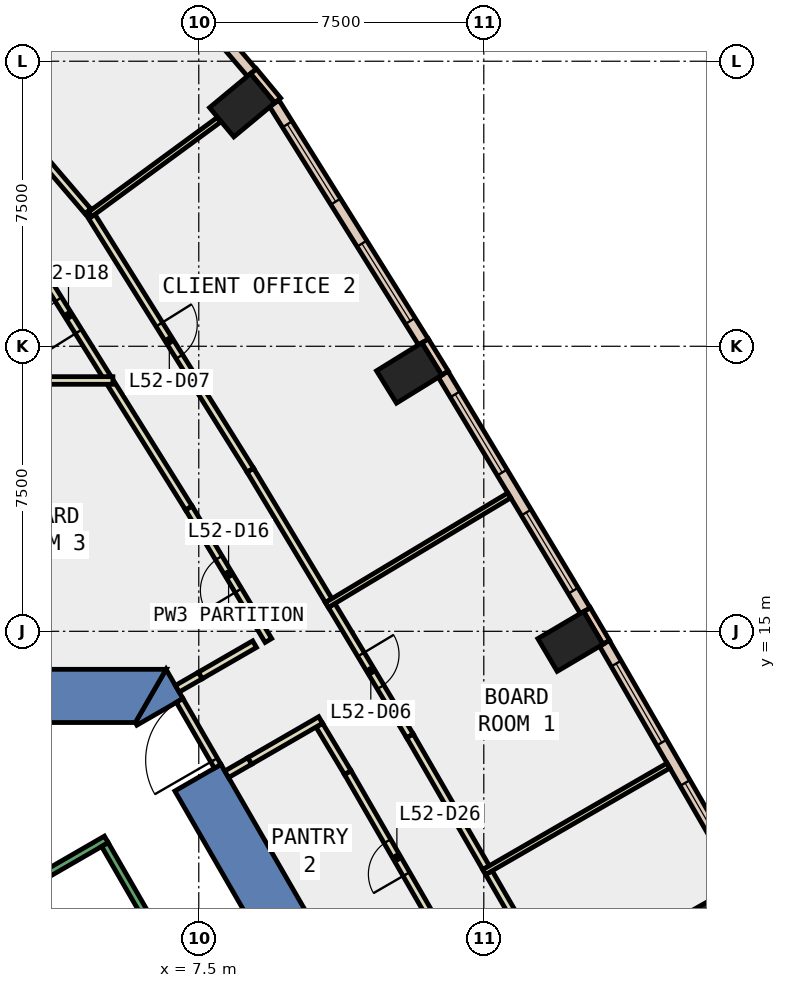
"""IFC4 building model, lengths in metres.
Left out: names, types, materials, properties, quantities, classifications, styles, units other than length and angle.
Written with IfcOpenShell. Run it as: python <this file> out.ifc"""

import sys

from ifc_helpers import new_model, si_unit, direction, frame, frame_2d, origin, origin_2d, place, context, subcontext, project, spatial, polyline, rectangle, outline, extrude, element, fill, save


model = new_model("IFC4")
c1 = context("Model", 3, precision=1e-05, world=origin(), true_north=direction((0.0, 1.0)))
c2 = subcontext(c1, "Body", "Model", "MODEL_VIEW")
j1 = project(units=[si_unit("LENGTHUNIT", "METRE"), si_unit("PLANEANGLEUNIT", "RADIAN")], contexts=[c1])
p1 = place(None, origin())
s1 = spatial("IfcSite", under=j1, at=p1, CompositionType="ELEMENT")
p2 = place(p1, origin())
s2 = spatial("IfcBuilding", under=s1, at=p2, CompositionType="ELEMENT")
p3 = place(p2, frame((0.0, 0.0, 231.8)))
s3 = spatial("IfcBuildingStorey", under=s2, at=p3, CompositionType="ELEMENT", Elevation=231.8)
for number, where, z_axis, x_axis in (
    (1, (21.4, 7.599, -0.4), (0.0, 0.0, 1.0), (-0.491, 0.871, 0.0)),
    (2, (17.28, 14.733, -0.4), (0.0, 0.0, 1.0), (-0.509, 0.861, 0.0)),
    (3, (13.036, 21.797, -0.4), (0.0, 0.0, 1.0), (-0.525, 0.851, 0.0)),
    (4, (8.642, 28.842, -0.4), (0.0, 0.0, 1.0), (-0.639, 0.769, 0.0)),
):
    element("IfcColumn", number, at=place(p3, frame(where, z_axis=z_axis, x_axis=x_axis)), inside=s3, PredefinedType="COLUMN", context=c2, shape_type="SweptSolid", body=[
        extrude(rectangle(XDim=1.0, YDim=1.4, at=origin_2d()), origin(), (0.0, 0.0, 1.0), 4.0),
    ])
p4 = place(p3, frame((0.0, 0.0, -0.4)))
e5 = element("IfcWall", 5, at=p4, inside=s3, PredefinedType="SHEAR", context=c2, shape_type="SweptSolid", body=[
    extrude(outline(polyline([(8.084, 11.498), (6.871, 10.798), (11.662, 2.5), (13.279, 2.5), (8.084, 11.498)])), origin(), (0.0, 0.0, 1.0), 4.0),
])
p5 = place(p3, frame((0.0, 0.0, -0.4)))
e6 = element("IfcWall", 6, at=p5, inside=s3, PredefinedType="SHEAR", context=c2, shape_type="SweptSolid", body=[
    extrude(outline(polyline([(5.871, 12.53), (7.084, 13.23), (6.64, 14.0), (5.831, 12.6), (5.871, 12.53)])), origin(), (0.0, 0.0, 1.0), 4.0),
])
p6 = place(p3, frame((0.0, 0.0, -0.4)))
e7 = element("IfcWall", 7, at=p6, inside=s3, PredefinedType="SHEAR", context=c2, shape_type="SweptSolid", body=[
    extrude(outline(polyline([(6.64, 14.0), (-6.64, 14.0), (-5.831, 12.6), (5.831, 12.6), (6.64, 14.0)])), origin(), (0.0, 0.0, 1.0), 4.0),
])
p7 = place(p3, frame((18.223, 14.71, 0.0), z_axis=(0.0, 0.0, 1.0), x_axis=(-0.507980373775, 0.861368643416, 0.0)))
e8 = element("IfcWall", 8, at=p7, inside=s3, PredefinedType="STANDARD", context=c2, shape_type="SweptSolid", body=[
    extrude(rectangle(XDim=1.0, YDim=0.2, at=frame_2d((0.5, 0.0))), origin(), (0.0, 0.0, 1.0), 3.6),
])
p8 = place(p3, frame((13.98, 21.792, 0.0), z_axis=(0.0, 0.0, 1.0), x_axis=(-0.525648735675, 0.850701714282, 0.0)))
e9 = element("IfcWall", 9, at=p8, inside=s3, PredefinedType="STANDARD", context=c2, shape_type="SweptSolid", body=[
    extrude(rectangle(XDim=1.0, YDim=0.2, at=frame_2d((0.5, 0.0))), origin(), (0.0, 0.0, 1.0), 3.6),
])
p9 = place(p3, frame((9.577, 28.968, 0.0), z_axis=(0.0, 0.0, 1.0), x_axis=(-0.637972365578, 0.770059257953, 0.0)))
e10 = element("IfcWall", 10, at=p9, inside=s3, PredefinedType="STANDARD", context=c2, shape_type="SweptSolid", body=[
    extrude(rectangle(XDim=1.0, YDim=0.2, at=frame_2d((0.5, 0.0))), origin(), (0.0, 0.0, 1.0), 3.6),
])
p10 = place(p3, frame((21.804, 8.399, 0.0), z_axis=(0.0, 0.0, 1.0), x_axis=(-0.500075798504, 0.865981637075, 0.0)))
e11 = element("IfcWall", 11, at=p10, inside=s3, PredefinedType="STANDARD", context=c2, shape_type="SweptSolid", body=[
    extrude(rectangle(XDim=7.257, YDim=0.3, at=frame_2d((3.628, 0.0))), origin(), (0.0, 0.0, 1.0), 3.6),
])
p11 = place(p10, frame((0.614, 0.0, 0.9)))
e12 = element("IfcOpeningElement", 12, at=p11, cuts=e11, PredefinedType="OPENING", context=c2, shape_type="SweptSolid", body=[
    extrude(rectangle(XDim=2.4, YDim=2.6, at=frame_2d((1.2, 1.3))), frame((0.0, 0.16, 0.0), z_axis=(0.0, -1.0, 0.0), x_axis=(1.0, 0.0, 0.0)), (0.0, 0.0, 1.0), 0.32),
])
p12 = place(p10, frame((4.242, 0.0, 0.9)))
e13 = element("IfcOpeningElement", 13, at=p12, cuts=e11, PredefinedType="OPENING", context=c2, shape_type="SweptSolid", body=[
    extrude(rectangle(XDim=2.4, YDim=2.6, at=frame_2d((1.2, 1.3))), frame((0.0, 0.16, 0.0), z_axis=(0.0, -1.0, 0.0), x_axis=(1.0, 0.0, 0.0)), (0.0, 0.0, 1.0), 0.32),
])
p13 = place(p3, frame((17.669, 15.542, 0.0), z_axis=(0.0, 0.0, 1.0), x_axis=(-0.515049705348, 0.857160312323, 0.0)))
e14 = element("IfcWall", 14, at=p13, inside=s3, PredefinedType="STANDARD", context=c2, shape_type="SweptSolid", body=[
    extrude(rectangle(XDim=7.258, YDim=0.3, at=frame_2d((3.629, 0.0))), origin(), (0.0, 0.0, 1.0), 3.6),
])
p14 = place(p13, frame((0.614, 0.0, 0.9)))
e15 = element("IfcOpeningElement", 15, at=p14, cuts=e14, PredefinedType="OPENING", context=c2, shape_type="SweptSolid", body=[
    extrude(rectangle(XDim=2.4, YDim=2.6, at=frame_2d((1.2, 1.3))), frame((0.0, 0.16, 0.0), z_axis=(0.0, -1.0, 0.0), x_axis=(1.0, 0.0, 0.0)), (0.0, 0.0, 1.0), 0.32),
])
p15 = place(p13, frame((4.243, 0.0, 0.9)))
e16 = element("IfcOpeningElement", 16, at=p15, cuts=e14, PredefinedType="OPENING", context=c2, shape_type="SweptSolid", body=[
    extrude(rectangle(XDim=2.4, YDim=2.6, at=frame_2d((1.2, 1.3))), frame((0.0, 0.16, 0.0), z_axis=(0.0, -1.0, 0.0), x_axis=(1.0, 0.0, 0.0)), (0.0, 0.0, 1.0), 0.32),
])
p16 = place(p3, frame((13.41, 22.614, 0.0), z_axis=(0.0, 0.0, 1.0), x_axis=(-0.530037467052, 0.847974223383, 0.0)))
e17 = element("IfcWall", 17, at=p16, inside=s3, PredefinedType="STANDARD", context=c2, shape_type="SweptSolid", body=[
    extrude(rectangle(XDim=7.405, YDim=0.3, at=frame_2d((3.702, 0.0))), origin(), (0.0, 0.0, 1.0), 3.6),
])
p17 = place(p16, frame((0.651, 0.0, 0.9)))
e18 = element("IfcOpeningElement", 18, at=p17, cuts=e17, PredefinedType="OPENING", context=c2, shape_type="SweptSolid", body=[
    extrude(rectangle(XDim=2.4, YDim=2.6, at=frame_2d((1.2, 1.3))), frame((0.0, 0.16, 0.0), z_axis=(0.0, -1.0, 0.0), x_axis=(1.0, 0.0, 0.0)), (0.0, 0.0, 1.0), 0.32),
])
p18 = place(p16, frame((4.354, 0.0, 0.9)))
e19 = element("IfcOpeningElement", 19, at=p18, cuts=e17, PredefinedType="OPENING", context=c2, shape_type="SweptSolid", body=[
    extrude(rectangle(XDim=2.4, YDim=2.6, at=frame_2d((1.2, 1.3))), frame((0.0, 0.16, 0.0), z_axis=(0.0, -1.0, 0.0), x_axis=(1.0, 0.0, 0.0)), (0.0, 0.0, 1.0), 0.32),
])
p19 = place(p3, frame((8.895, 29.7, 0.0), z_axis=(0.0, 0.0, 1.0), x_axis=(-0.649967502437, 0.75996200285, 0.0)))
e20 = element("IfcWall", 20, at=p19, inside=s3, PredefinedType="STANDARD", context=c2, shape_type="SweptSolid", body=[
    extrude(rectangle(XDim=4.492, YDim=0.3, at=frame_2d((2.246, 0.0))), origin(), (0.0, 0.0, 1.0), 3.6),
])
p20 = place(p19, frame((1.546, 0.0, 0.9)))
e21 = element("IfcOpeningElement", 21, at=p20, cuts=e20, PredefinedType="OPENING", context=c2, shape_type="SweptSolid", body=[
    extrude(rectangle(XDim=1.4, YDim=2.6, at=frame_2d((0.7, 1.3))), frame((0.0, 0.16, 0.0), z_axis=(0.0, -1.0, 0.0), x_axis=(1.0, 0.0, 0.0)), (0.0, 0.0, 1.0), 0.32),
])
p21 = place(p3, frame((14.006, 6.804, 0.0), z_axis=(0.0, 0.0, 1.0), x_axis=(-0.500032993936, 0.866006353889, 0.0)))
e22 = element("IfcWall", 22, at=p21, inside=s3, PredefinedType="PARTITIONING", context=c2, shape_type="SweptSolid", body=[
    extrude(rectangle(XDim=5.172, YDim=0.2, at=frame_2d((2.586, 0.0))), origin(), (0.0, 0.0, 1.0), 3.6),
])
p22 = place(p21, frame((2.086, 0.0, 0.0)))
e23 = element("IfcOpeningElement", 23, at=p22, cuts=e22, PredefinedType="OPENING", context=c2, shape_type="SweptSolid", body=[
    extrude(rectangle(XDim=1.0, YDim=2.1, at=frame_2d((0.5, 1.05))), frame((0.0, 0.11, 0.0), z_axis=(0.0, -1.0, 0.0), x_axis=(1.0, 0.0, 0.0)), (0.0, 0.0, 1.0), 0.22),
])
p23 = place(p3, frame((11.42, 11.283, 0.0), z_axis=(0.0, 0.0, 1.0), x_axis=(-0.514890585899, 0.857255903772, 0.0)))
e24 = element("IfcWall", 24, at=p23, inside=s3, PredefinedType="PARTITIONING", context=c2, shape_type="SweptSolid", body=[
    extrude(rectangle(XDim=1.455, YDim=0.2, at=frame_2d((0.728, 0.0))), origin(), (0.0, 0.0, 1.0), 3.6),
])
p24 = place(p3, frame((10.706, 12.666, 0.0), z_axis=(0.0, 0.0, 1.0), x_axis=(-0.865862892194, -0.50028137275, 0.0)))
e25 = element("IfcWall", 25, at=p24, inside=s3, PredefinedType="PARTITIONING", context=c2, shape_type="SweptSolid", body=[
    extrude(rectangle(XDim=2.155, YDim=0.2, at=frame_2d((1.078, 0.0))), origin(), (0.0, 0.0, 1.0), 3.6),
])
p25 = place(p3, frame((6.935, 13.488, 0.0), z_axis=(0.0, 0.0, 1.0), x_axis=(0.866022890907, 0.500004352405, 0.0)))
e26 = element("IfcWall", 26, at=p25, inside=s3, PredefinedType="PARTITIONING", context=c2, shape_type="SweptSolid", body=[
    extrude(rectangle(XDim=0.7, YDim=0.2, at=frame_2d((0.35, 0.0))), origin(), (0.0, 0.0, 1.0), 2.4),
])
p26 = place(p3, frame((9.332, 14.759, 0.0), z_axis=(0.0, 0.0, 1.0), x_axis=(-0.514989912292, 0.857196237881, 0.0)))
e27 = element("IfcWall", 27, at=p26, inside=s3, PredefinedType="PARTITIONING", context=c2, shape_type="SweptSolid", body=[
    extrude(rectangle(XDim=4.068, YDim=0.2, at=frame_2d((2.034, 0.0))), origin(), (0.0, 0.0, 1.0), 3.6),
])
p27 = place(p26, frame((1.534, 0.0, 0.0)))
e28 = element("IfcOpeningElement", 28, at=p27, cuts=e27, PredefinedType="OPENING", context=c2, shape_type="SweptSolid", body=[
    extrude(rectangle(XDim=1.0, YDim=2.1, at=frame_2d((0.5, 1.05))), frame((0.0, 0.11, 0.0), z_axis=(0.0, -1.0, 0.0), x_axis=(1.0, 0.0, 0.0)), (0.0, 0.0, 1.0), 0.22),
])
p28 = place(p3, frame((7.237, 18.246, 0.0), z_axis=(0.0, 0.0, 1.0), x_axis=(-0.530175390862, 0.847887996686, 0.0)))
e29 = element("IfcWall", 29, at=p28, inside=s3, PredefinedType="PARTITIONING", context=c2, shape_type="SweptSolid", body=[
    extrude(rectangle(XDim=3.855, YDim=0.2, at=frame_2d((1.928, 0.0))), origin(), (0.0, 0.0, 1.0), 3.6),
])
p29 = place(p3, frame((5.087, 21.685, 0.0), z_axis=(0.0, 0.0, 1.0), x_axis=(-0.529998940003, 0.847998304005, 0.0)))
e30 = element("IfcWall", 30, at=p29, inside=s3, PredefinedType="PARTITIONING", context=c2, shape_type="SweptSolid", body=[
    extrude(rectangle(XDim=3.83, YDim=0.2, at=frame_2d((1.915, 0.0))), origin(), (0.0, 0.0, 1.0), 3.6),
])
p30 = place(p29, frame((1.416, 0.0, 0.0)))
e31 = element("IfcOpeningElement", 31, at=p30, cuts=e30, PredefinedType="OPENING", context=c2, shape_type="SweptSolid", body=[
    extrude(rectangle(XDim=1.0, YDim=2.1, at=frame_2d((0.5, 1.05))), frame((0.0, 0.11, 0.0), z_axis=(0.0, -1.0, 0.0), x_axis=(1.0, 0.0, 0.0)), (0.0, 0.0, 1.0), 0.22),
])
p31 = place(p3, frame((15.135, 8.65, 0.0), z_axis=(0.0, 0.0, 1.0), x_axis=(0.500102734445, -0.865966081899, 0.0)))
e32 = element("IfcWall", 32, at=p31, inside=s3, PredefinedType="PARTITIONING", context=c2, shape_type="SweptSolid", body=[
    extrude(rectangle(XDim=4.001, YDim=0.2, at=frame_2d((2.0, 0.0))), origin(), (0.0, 0.0, 1.0), 3.6),
])
p32 = place(p3, frame((10.996, 15.679, 0.0), z_axis=(0.0, 0.0, 1.0), x_axis=(0.514800663461, -0.857309907152, 0.0)))
e33 = element("IfcWall", 33, at=p32, inside=s3, PredefinedType="PARTITIONING", context=c2, shape_type="SweptSolid", body=[
    extrude(rectangle(XDim=4.003, YDim=0.2, at=frame_2d((2.001, 0.0))), origin(), (0.0, 0.0, 1.0), 3.6),
])
p33 = place(p32, frame((1.502, 0.0, 0.0)))
e34 = element("IfcOpeningElement", 34, at=p33, cuts=e33, PredefinedType="OPENING", context=c2, shape_type="SweptSolid", body=[
    extrude(rectangle(XDim=1.0, YDim=2.1, at=frame_2d((0.5, 1.05))), frame((0.0, 0.11, 0.0), z_axis=(0.0, -1.0, 0.0), x_axis=(1.0, 0.0, 0.0)), (0.0, 0.0, 1.0), 0.22),
])
p34 = place(p3, frame((13.057, 12.247, 0.0), z_axis=(0.0, 0.0, 1.0), x_axis=(0.500093699572, -0.865971299552, 0.0)))
e35 = element("IfcWall", 35, at=p34, inside=s3, PredefinedType="PARTITIONING", context=c2, shape_type="SweptSolid", body=[
    extrude(rectangle(XDim=4.004, YDim=0.2, at=frame_2d((2.002, 0.0))), origin(), (0.0, 0.0, 1.0), 3.6),
])
p35 = place(p3, frame((4.593, 26.061, 0.0), z_axis=(0.0, 0.0, 1.0), x_axis=(0.530012579093, -0.847989779421, 0.0)))
e36 = element("IfcWall", 36, at=p35, inside=s3, PredefinedType="PARTITIONING", context=c2, shape_type="SweptSolid", body=[
    extrude(rectangle(XDim=8.045, YDim=0.2, at=frame_2d((4.022, 0.0))), origin(), (0.0, 0.0, 1.0), 3.6),
])
p36 = place(p35, frame((3.522, 0.0, 0.0)))
e37 = element("IfcOpeningElement", 37, at=p36, cuts=e36, PredefinedType="OPENING", context=c2, shape_type="SweptSolid", body=[
    extrude(rectangle(XDim=1.0, YDim=2.1, at=frame_2d((0.5, 1.05))), frame((0.0, 0.11, 0.0), z_axis=(0.0, -1.0, 0.0), x_axis=(1.0, 0.0, 0.0)), (0.0, 0.0, 1.0), 0.22),
])
p37 = place(p3, frame((8.857, 19.239, 0.0), z_axis=(0.0, 0.0, 1.0), x_axis=(0.514953174362, -0.857218308376, 0.0)))
e38 = element("IfcWall", 38, at=p37, inside=s3, PredefinedType="PARTITIONING", context=c2, shape_type="SweptSolid", body=[
    extrude(rectangle(XDim=4.002, YDim=0.2, at=frame_2d((2.001, 0.0))), origin(), (0.0, 0.0, 1.0), 3.6),
])
p38 = place(p3, frame((2.316, 28.7, 0.0), z_axis=(0.0, 0.0, 1.0), x_axis=(0.650040973726, -0.759899159413, 0.0)))
e39 = element("IfcWall", 39, at=p38, inside=s3, PredefinedType="PARTITIONING", context=c2, shape_type="SweptSolid", body=[
    extrude(rectangle(XDim=3.485, YDim=0.2, at=frame_2d((1.742, 0.0))), origin(), (0.0, 0.0, 1.0), 3.6),
])
p39 = place(p3, frame((0.4, 21.6, 0.0), z_axis=(0.0, 0.0, 1.0), x_axis=(1.0, 0.0, 0.0)))
e40 = element("IfcWall", 40, at=p39, inside=s3, PredefinedType="PARTITIONING", context=c2, shape_type="SweptSolid", body=[
    extrude(rectangle(XDim=4.84, YDim=0.2, at=frame_2d((2.42, 0.0))), origin(), (0.0, 0.0, 1.0), 3.6),
])
p40 = place(p3, frame((15.01, 8.665, 0.0), z_axis=(0.0, 0.0, 1.0), x_axis=(0.865961984968, 0.500109828528, 0.0)))
e41 = element("IfcWall", 41, at=p40, inside=s3, PredefinedType="PARTITIONING", context=c2, shape_type="SweptSolid", body=[
    extrude(rectangle(XDim=5.601, YDim=0.15, at=frame_2d((2.8, 0.0))), origin(), (0.0, 0.0, 1.0), 3.6),
])
p41 = place(p3, frame((10.871, 15.692, 0.0), z_axis=(0.0, 0.0, 1.0), x_axis=(0.857165756431, 0.515040645001, 0.0)))
e42 = element("IfcWall", 42, at=p41, inside=s3, PredefinedType="PARTITIONING", context=c2, shape_type="SweptSolid", body=[
    extrude(rectangle(XDim=5.6, YDim=0.15, at=frame_2d((2.8, 0.0))), origin(), (0.0, 0.0, 1.0), 3.6),
])
p42 = place(p3, frame((4.646, 25.976, 0.0), z_axis=(0.0, 0.0, 1.0), x_axis=(0.806134630684, 0.591732166788, 0.0)))
e43 = element("IfcWall", 43, at=p42, inside=s3, PredefinedType="PARTITIONING", context=c2, shape_type="SweptSolid", body=[
    extrude(rectangle(XDim=4.193, YDim=0.15, at=frame_2d((2.096, 0.0))), origin(), (0.0, 0.0, 1.0), 3.6),
])
p43 = place(p3, frame((7.997, 11.448, 0.0), z_axis=(0.0, 0.0, 1.0), x_axis=(-0.50002537861, 0.866010750942, 0.0)))
e44 = element("IfcWall", 44, at=p43, inside=s3, PredefinedType="PARTITIONING", context=c2, shape_type="SweptSolid", body=[
    extrude(rectangle(XDim=2.0, YDim=0.2, at=frame_2d((1.0, 0.0))), origin(), (0.0, 0.0, 1.0), 2.4),
])
p44 = place(p43, frame((0.19, 0.0, 0.0)))
e45 = element("IfcOpeningElement", 45, at=p44, cuts=e44, PredefinedType="OPENING", context=c2, shape_type="SweptSolid", body=[
    extrude(rectangle(XDim=1.8, YDim=2.1, at=frame_2d((0.9, 1.05))), frame((0.0, 0.11, 0.0), z_axis=(0.0, -1.0, 0.0), x_axis=(1.0, 0.0, 0.0)), (0.0, 0.0, 1.0), 0.22),
])
p45 = place(p3, frame((8.84, 11.588, 0.0), z_axis=(0.0, 0.0, 1.0), x_axis=(-0.866110083249, -0.499853302173, 0.0)))
e46 = element("IfcWall", 46, at=p45, inside=s3, PredefinedType="PARTITIONING", context=c2, shape_type="SweptSolid", body=[
    extrude(rectangle(XDim=0.7, YDim=0.2, at=frame_2d((0.35, 0.0))), origin(), (0.0, 0.0, 1.0), 2.4),
])
p46 = place(p3, frame((7.541, 13.838, 0.0), z_axis=(0.0, 0.0, 1.0), x_axis=(0.86593636949, 0.500154180222, 0.0)))
e47 = element("IfcWall", 47, at=p46, inside=s3, PredefinedType="PARTITIONING", context=c2, shape_type="SweptSolid", body=[
    extrude(rectangle(XDim=1.648, YDim=0.2, at=frame_2d((0.824, 0.0))), origin(), (0.0, 0.0, 1.0), 3.6),
])
p47 = place(p3, frame((2.7, 8.158, 0.0), z_axis=(0.0, 0.0, 1.0), x_axis=(0.86611865017, 0.499838457731, 0.0)))
e48 = element("IfcWall", 48, at=p47, inside=s3, PredefinedType="STANDARD", context=c2, shape_type="SweptSolid", body=[
    extrude(rectangle(XDim=2.733, YDim=0.2, at=frame_2d((1.366, 0.0))), origin(), (0.0, 0.0, 1.0), 3.6),
])
p48 = place(p3, frame((8.48, 3.412, 0.0), z_axis=(0.0, 0.0, 1.0), x_axis=(-0.499978703459, 0.866037698999, 0.0)))
e49 = element("IfcWall", 49, at=p48, inside=s3, PredefinedType="STANDARD", context=c2, shape_type="SweptSolid", body=[
    extrude(rectangle(XDim=6.9, YDim=0.2, at=frame_2d((3.45, 0.0))), origin(), (0.0, 0.0, 1.0), 3.6),
])
p49 = place(p11, origin())
e50 = element("IfcWindow", 50, at=p49, inside=s3, PartitioningType="SINGLE_PANEL", PredefinedType="WINDOW", context=c2, shape_type="SweptSolid", body=[
    extrude(rectangle(XDim=2.4, YDim=2.6, at=frame_2d((1.2, 1.3))), frame((0.0, 0.03, 0.0), z_axis=(0.0, -1.0, 0.0), x_axis=(1.0, 0.0, 0.0)), (0.0, 0.0, 1.0), 0.06),
])
fill(e12, e50)
p50 = place(p12, origin())
e51 = element("IfcWindow", 51, at=p50, inside=s3, PartitioningType="SINGLE_PANEL", PredefinedType="WINDOW", context=c2, shape_type="SweptSolid", body=[
    extrude(rectangle(XDim=2.4, YDim=2.6, at=frame_2d((1.2, 1.3))), frame((0.0, 0.03, 0.0), z_axis=(0.0, -1.0, 0.0), x_axis=(1.0, 0.0, 0.0)), (0.0, 0.0, 1.0), 0.06),
])
fill(e13, e51)
p51 = place(p14, origin())
e52 = element("IfcWindow", 52, at=p51, inside=s3, PartitioningType="SINGLE_PANEL", PredefinedType="WINDOW", context=c2, shape_type="SweptSolid", body=[
    extrude(rectangle(XDim=2.4, YDim=2.6, at=frame_2d((1.2, 1.3))), frame((0.0, 0.03, 0.0), z_axis=(0.0, -1.0, 0.0), x_axis=(1.0, 0.0, 0.0)), (0.0, 0.0, 1.0), 0.06),
])
fill(e15, e52)
p52 = place(p15, origin())
e53 = element("IfcWindow", 53, at=p52, inside=s3, PartitioningType="SINGLE_PANEL", PredefinedType="WINDOW", context=c2, shape_type="SweptSolid", body=[
    extrude(rectangle(XDim=2.4, YDim=2.6, at=frame_2d((1.2, 1.3))), frame((0.0, 0.03, 0.0), z_axis=(0.0, -1.0, 0.0), x_axis=(1.0, 0.0, 0.0)), (0.0, 0.0, 1.0), 0.06),
])
fill(e16, e53)
p53 = place(p17, origin())
e54 = element("IfcWindow", 54, at=p53, inside=s3, PartitioningType="SINGLE_PANEL", PredefinedType="WINDOW", context=c2, shape_type="SweptSolid", body=[
    extrude(rectangle(XDim=2.4, YDim=2.6, at=frame_2d((1.2, 1.3))), frame((0.0, 0.03, 0.0), z_axis=(0.0, -1.0, 0.0), x_axis=(1.0, 0.0, 0.0)), (0.0, 0.0, 1.0), 0.06),
])
fill(e18, e54)
p54 = place(p18, origin())
e55 = element("IfcWindow", 55, at=p54, inside=s3, PartitioningType="SINGLE_PANEL", PredefinedType="WINDOW", context=c2, shape_type="SweptSolid", body=[
    extrude(rectangle(XDim=2.4, YDim=2.6, at=frame_2d((1.2, 1.3))), frame((0.0, 0.03, 0.0), z_axis=(0.0, -1.0, 0.0), x_axis=(1.0, 0.0, 0.0)), (0.0, 0.0, 1.0), 0.06),
])
fill(e19, e55)
p55 = place(p33, origin())
e56 = element("IfcDoor", 56, at=p55, inside=s3, OperationType="SINGLE_SWING_LEFT", PredefinedType="DOOR", context=c2, shape_type="SweptSolid", body=[
    extrude(rectangle(XDim=1.0, YDim=2.1, at=frame_2d((0.5, 1.05))), frame((0.0, 0.025, 0.0), z_axis=(0.0, -1.0, 0.0), x_axis=(1.0, 0.0, 0.0)), (0.0, 0.0, 1.0), 0.05),
])
fill(e34, e56)
p56 = place(p36, origin())
e57 = element("IfcDoor", 57, at=p56, inside=s3, OperationType="SINGLE_SWING_LEFT", PredefinedType="DOOR", context=c2, shape_type="SweptSolid", body=[
    extrude(rectangle(XDim=1.0, YDim=2.1, at=frame_2d((0.5, 1.05))), frame((0.0, 0.025, 0.0), z_axis=(0.0, -1.0, 0.0), x_axis=(1.0, 0.0, 0.0)), (0.0, 0.0, 1.0), 0.05),
])
fill(e37, e57)
p57 = place(p27, origin())
e58 = element("IfcDoor", 58, at=p57, inside=s3, OperationType="SINGLE_SWING_LEFT", PredefinedType="DOOR", context=c2, shape_type="SweptSolid", body=[
    extrude(rectangle(XDim=1.0, YDim=2.1, at=frame_2d((0.5, 1.05))), frame((0.0, 0.025, 0.0), z_axis=(0.0, -1.0, 0.0), x_axis=(1.0, 0.0, 0.0)), (0.0, 0.0, 1.0), 0.05),
])
fill(e28, e58)
p58 = place(p30, origin())
e59 = element("IfcDoor", 59, at=p58, inside=s3, OperationType="SINGLE_SWING_LEFT", PredefinedType="DOOR", context=c2, shape_type="SweptSolid", body=[
    extrude(rectangle(XDim=1.0, YDim=2.1, at=frame_2d((0.5, 1.05))), frame((0.0, 0.025, 0.0), z_axis=(0.0, -1.0, 0.0), x_axis=(1.0, 0.0, 0.0)), (0.0, 0.0, 1.0), 0.05),
])
fill(e31, e59)
p59 = place(p22, origin())
e60 = element("IfcDoor", 60, at=p59, inside=s3, OperationType="SINGLE_SWING_LEFT", PredefinedType="DOOR", context=c2, shape_type="SweptSolid", body=[
    extrude(rectangle(XDim=1.0, YDim=2.1, at=frame_2d((0.5, 1.05))), frame((0.0, 0.025, 0.0), z_axis=(0.0, -1.0, 0.0), x_axis=(1.0, 0.0, 0.0)), (0.0, 0.0, 1.0), 0.05),
])
fill(e23, e60)
p60 = place(p44, origin())
e61 = element("IfcDoor", 61, at=p60, inside=s3, OperationType="DOUBLE_DOOR_SINGLE_SWING", PredefinedType="DOOR", context=c2, shape_type="SweptSolid", body=[
    extrude(rectangle(XDim=1.8, YDim=2.1, at=frame_2d((0.9, 1.05))), frame((0.0, 0.025, 0.0), z_axis=(0.0, -1.0, 0.0), x_axis=(1.0, 0.0, 0.0)), (0.0, 0.0, 1.0), 0.05),
])
fill(e45, e61)
save(model, sys.argv[1])
